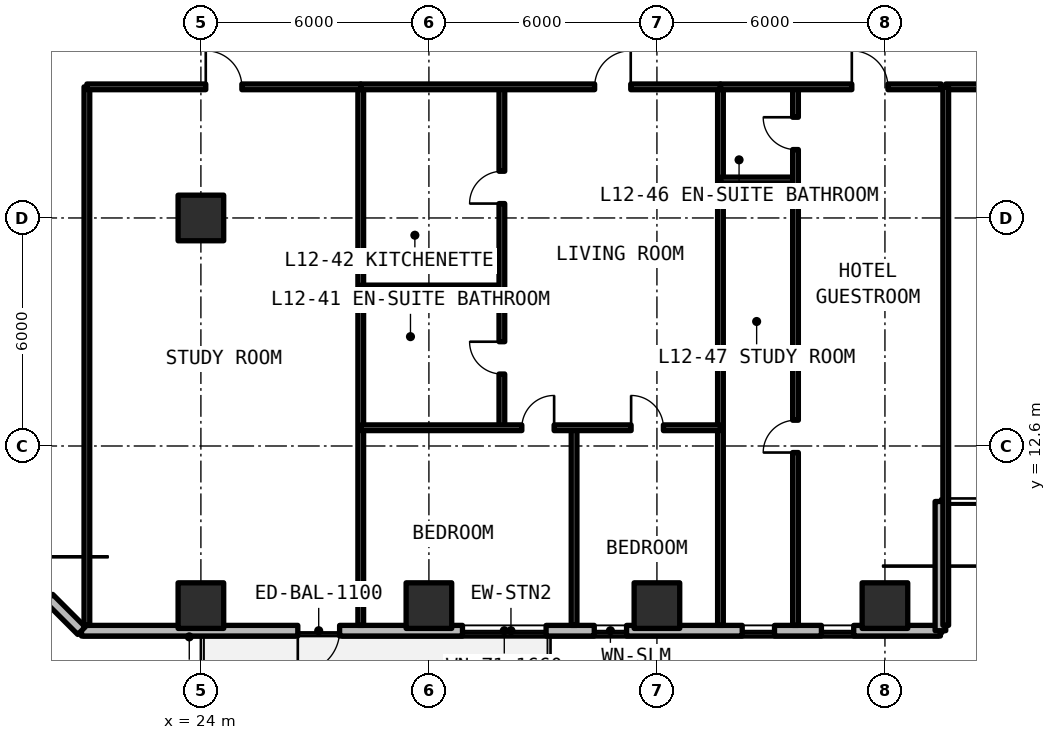
"""IFC4 building model, lengths in metres.
Left out: names, types, materials, properties, quantities, classifications, styles, units other than length and angle.
Written with IfcOpenShell. Run it as: python <this file> out.ifc"""

import sys

from ifc_helpers import new_model, si_unit, direction, frame, frame_2d, origin, origin_2d, place, context, subcontext, project, spatial, rectangle, extrude, element, fill, save


model = new_model("IFC4")
c1 = context("Model", 3, precision=1e-05, world=origin(), true_north=direction((0.0, 1.0)))
c2 = subcontext(c1, "Body", "Model", "MODEL_VIEW")
j1 = project(units=[si_unit("LENGTHUNIT", "METRE"), si_unit("PLANEANGLEUNIT", "RADIAN")], contexts=[c1])
p1 = place(None, origin())
s1 = spatial("IfcSite", under=j1, at=p1, CompositionType="ELEMENT")
p2 = place(p1, origin())
s2 = spatial("IfcBuilding", under=s1, at=p2, CompositionType="ELEMENT")
p3 = place(p2, frame((0.0, 0.0, 45.54)))
s3 = spatial("IfcBuildingStorey", under=s2, at=p3, CompositionType="ELEMENT", Elevation=45.54)
for number, where, z_axis, x_axis in (
    (1, (24.0, 18.6, 0.0), (0.0, 0.0, 1.0), (1.0, 0.0, 0.0)),
    (2, (24.0, 8.4, 0.0), (0.0, 0.0, 1.0), (1.0, 0.0, 0.0)),
    (3, (30.0, 8.4, 0.0), (0.0, 0.0, 1.0), (1.0, 0.0, 0.0)),
    (4, (36.0, 8.4, 0.0), (0.0, 0.0, 1.0), (1.0, 0.0, 0.0)),
    (5, (42.0, 8.4, 0.0), (0.0, 0.0, 1.0), (1.0, 0.0, 0.0)),
):
    element("IfcColumn", number, at=place(p3, frame(where, z_axis=z_axis, x_axis=x_axis)), inside=s3, PredefinedType="COLUMN", context=c2, shape_type="SweptSolid", body=[
        extrude(rectangle(XDim=1.2, YDim=1.2, at=origin_2d()), origin(), (0.0, 0.0, 1.0), 3.3),
    ])
p4 = place(p3, frame((20.858, 7.74, 0.0), z_axis=(0.0, 0.0, 1.0), x_axis=(1.0, 0.0, 0.0)))
e6 = element("IfcWall", 6, at=p4, inside=s3, PredefinedType="SOLIDWALL", context=c2, shape_type="SweptSolid", body=[
    extrude(rectangle(XDim=22.602, YDim=0.28, at=frame_2d((11.301, 0.0))), origin(), (0.0, 0.0, 1.0), 3.08),
])
p5 = place(p4, frame((5.692, 0.0, 0.0)))
e7 = element("IfcOpeningElement", 7, at=p5, cuts=e6, PredefinedType="OPENING", context=c2, shape_type="SweptSolid", body=[
    extrude(rectangle(XDim=1.1, YDim=2.15, at=frame_2d((0.55, 1.075))), frame((0.0, 0.15, 0.0), z_axis=(0.0, -1.0, 0.0), x_axis=(1.0, 0.0, 0.0)), (0.0, 0.0, 1.0), 0.3),
])
p6 = place(p4, frame((10.025, 0.0, 0.78)))
e8 = element("IfcOpeningElement", 8, at=p6, cuts=e6, PredefinedType="OPENING", context=c2, shape_type="SweptSolid", body=[
    extrude(rectangle(XDim=2.2, YDim=1.66, at=frame_2d((1.1, 0.83))), frame((0.0, 0.15, 0.0), z_axis=(0.0, -1.0, 0.0), x_axis=(1.0, 0.0, 0.0)), (0.0, 0.0, 1.0), 0.3),
])
p7 = place(p4, frame((13.493, 0.0, 0.78)))
e9 = element("IfcOpeningElement", 9, at=p7, cuts=e6, PredefinedType="OPENING", context=c2, shape_type="SweptSolid", body=[
    extrude(rectangle(XDim=0.85, YDim=1.65, at=frame_2d((0.425, 0.825))), frame((0.0, 0.15, 0.0), z_axis=(0.0, -1.0, 0.0), x_axis=(1.0, 0.0, 0.0)), (0.0, 0.0, 1.0), 0.3),
])
p8 = place(p4, frame((17.386, 0.0, 0.78)))
e10 = element("IfcOpeningElement", 10, at=p8, cuts=e6, PredefinedType="OPENING", context=c2, shape_type="SweptSolid", body=[
    extrude(rectangle(XDim=0.85, YDim=1.65, at=frame_2d((0.425, 0.825))), frame((0.0, 0.15, 0.0), z_axis=(0.0, -1.0, 0.0), x_axis=(1.0, 0.0, 0.0)), (0.0, 0.0, 1.0), 0.3),
])
p9 = place(p4, frame((19.47, 0.0, 0.78)))
e11 = element("IfcOpeningElement", 11, at=p9, cuts=e6, PredefinedType="OPENING", context=c2, shape_type="SweptSolid", body=[
    extrude(rectangle(XDim=0.85, YDim=1.65, at=frame_2d((0.425, 0.825))), frame((0.0, 0.15, 0.0), z_axis=(0.0, -1.0, 0.0), x_axis=(1.0, 0.0, 0.0)), (0.0, 0.0, 1.0), 0.3),
])
p10 = place(p3, frame((43.46, 7.74, 0.0), z_axis=(0.0, 0.0, 1.0), x_axis=(0.0, 1.0, 0.0)))
e12 = element("IfcWall", 12, at=p10, inside=s3, PredefinedType="SOLIDWALL", context=c2, shape_type="SweptSolid", body=[
    extrude(rectangle(XDim=3.4, YDim=0.28, at=frame_2d((1.7, 0.0))), origin(), (0.0, 0.0, 1.0), 3.08),
])
p11 = place(p3, frame((16.74, 11.858, 0.0), z_axis=(0.0, 0.0, 1.0), x_axis=(0.707106781187, -0.707106781187, 0.0)))
e13 = element("IfcWall", 13, at=p11, inside=s3, PredefinedType="SOLIDWALL", context=c2, shape_type="SweptSolid", body=[
    extrude(rectangle(XDim=5.824, YDim=0.28, at=frame_2d((2.912, 0.0))), origin(), (0.0, 0.0, 1.0), 3.08),
])
p12 = place(p11, frame((1.212, 0.0, 0.78)))
e14 = element("IfcOpeningElement", 14, at=p12, cuts=e13, PredefinedType="OPENING", context=c2, shape_type="SweptSolid", body=[
    extrude(rectangle(XDim=3.4, YDim=1.66, at=frame_2d((1.7, 0.83))), frame((0.0, 0.15, 0.0), z_axis=(0.0, -1.0, 0.0), x_axis=(1.0, 0.0, 0.0)), (0.0, 0.0, 1.0), 0.3),
])
p13 = place(p3, frame((43.6, 22.05, 0.0), z_axis=(0.0, 0.0, 1.0), x_axis=(1.0, 0.0, 0.0)))
e15 = element("IfcWall", 15, at=p13, inside=s3, PredefinedType="SOLIDWALL", context=c2, shape_type="SweptSolid", body=[
    extrude(rectangle(XDim=8.4, YDim=0.15, at=frame_2d((4.2, 0.0))), origin(), (0.0, 0.0, 1.0), 2.35),
])
p14 = place(p13, frame((3.65, 0.0, 0.0)))
e16 = element("IfcOpeningElement", 16, at=p14, cuts=e15, PredefinedType="OPENING", context=c2, shape_type="SweptSolid", body=[
    extrude(rectangle(XDim=1.1, YDim=2.15, at=frame_2d((0.55, 1.075))), frame((0.0, 0.085, 0.0), z_axis=(0.0, -1.0, 0.0), x_axis=(1.0, 0.0, 0.0)), (0.0, 0.0, 1.0), 0.17),
])
for number, where, z_axis, x_axis in (
    (17, (43.6, 7.88, 0.0), (0.0, 0.0, 1.0), (0.0, 1.0, 0.0)),
    (18, (21.0, 7.88, 0.0), (0.0, 0.0, 1.0), (0.0, 1.0, 0.0)),
    (19, (28.207, 7.88, 0.0), (0.0, 0.0, 1.0), (0.0, 1.0, 0.0)),
):
    element("IfcWall", number, at=place(p3, frame(where, z_axis=z_axis, x_axis=x_axis)), inside=s3, PredefinedType="SOLIDWALL", context=c2, shape_type="SweptSolid", body=[
        extrude(rectangle(XDim=14.17, YDim=0.15, at=frame_2d((7.085, 0.0))), origin(), (0.0, 0.0, 1.0), 2.35),
    ])
p15 = place(p3, frame((21.0, 22.05, 0.0), z_axis=(0.0, 0.0, 1.0), x_axis=(1.0, 0.0, 0.0)))
e20 = element("IfcWall", 20, at=p15, inside=s3, PredefinedType="SOLIDWALL", context=c2, shape_type="SweptSolid", body=[
    extrude(rectangle(XDim=7.207, YDim=0.15, at=frame_2d((3.603, 0.0))), origin(), (0.0, 0.0, 1.0), 2.35),
])
p16 = place(p15, frame((3.128, 0.0, 0.0)))
e21 = element("IfcOpeningElement", 21, at=p16, cuts=e20, PredefinedType="OPENING", context=c2, shape_type="SweptSolid", body=[
    extrude(rectangle(XDim=0.95, YDim=2.15, at=frame_2d((0.475, 1.075))), frame((0.0, 0.085, 0.0), z_axis=(0.0, -1.0, 0.0), x_axis=(1.0, 0.0, 0.0)), (0.0, 0.0, 1.0), 0.17),
])
p17 = place(p3, frame((37.672, 7.88, 0.0), z_axis=(0.0, 0.0, 1.0), x_axis=(0.0, 1.0, 0.0)))
e22 = element("IfcWall", 22, at=p17, inside=s3, PredefinedType="SOLIDWALL", context=c2, shape_type="SweptSolid", body=[
    extrude(rectangle(XDim=14.17, YDim=0.15, at=frame_2d((7.085, 0.0))), origin(), (0.0, 0.0, 1.0), 2.35),
])
p18 = place(p3, frame((28.207, 16.758, 0.0), z_axis=(0.0, 0.0, 1.0), x_axis=(1.0, 0.0, 0.0)))
e23 = element("IfcWall", 23, at=p18, inside=s3, PredefinedType="PARTITIONING", context=c2, shape_type="SweptSolid", body=[
    extrude(rectangle(XDim=3.713, YDim=0.15, at=frame_2d((1.857, 0.0))), origin(), (0.0, 0.0, 1.0), 2.35),
])
p19 = place(p3, frame((31.92, 13.08, 0.0), z_axis=(0.0, 0.0, 1.0), x_axis=(0.0, 1.0, 0.0)))
e24 = element("IfcWall", 24, at=p19, inside=s3, PredefinedType="PARTITIONING", context=c2, shape_type="SweptSolid", body=[
    extrude(rectangle(XDim=8.97, YDim=0.15, at=frame_2d((4.485, 0.0))), origin(), (0.0, 0.0, 1.0), 2.35),
])
p20 = place(p19, frame((1.414, 0.0, 0.0)))
e25 = element("IfcOpeningElement", 25, at=p20, cuts=e24, PredefinedType="OPENING", context=c2, shape_type="SweptSolid", body=[
    extrude(rectangle(XDim=0.85, YDim=2.1, at=frame_2d((0.425, 1.05))), frame((0.0, 0.085, 0.0), z_axis=(0.0, -1.0, 0.0), x_axis=(1.0, 0.0, 0.0)), (0.0, 0.0, 1.0), 0.17),
])
p21 = place(p19, frame((5.899, 0.0, 0.0)))
e26 = element("IfcOpeningElement", 26, at=p21, cuts=e24, PredefinedType="OPENING", context=c2, shape_type="SweptSolid", body=[
    extrude(rectangle(XDim=0.85, YDim=2.1, at=frame_2d((0.425, 1.05))), frame((0.0, 0.085, 0.0), z_axis=(0.0, -1.0, 0.0), x_axis=(1.0, 0.0, 0.0)), (0.0, 0.0, 1.0), 0.17),
])
p22 = place(p3, frame((33.82, 7.88, 0.0), z_axis=(0.0, 0.0, 1.0), x_axis=(0.0, 1.0, 0.0)))
e27 = element("IfcWall", 27, at=p22, inside=s3, PredefinedType="PARTITIONING", context=c2, shape_type="SweptSolid", body=[
    extrude(rectangle(XDim=5.2, YDim=0.15, at=frame_2d((2.6, 0.0))), origin(), (0.0, 0.0, 1.0), 2.35),
])
p23 = place(p3, frame((28.207, 13.08, 0.0), z_axis=(0.0, 0.0, 1.0), x_axis=(1.0, 0.0, 0.0)))
e28 = element("IfcWall", 28, at=p23, inside=s3, PredefinedType="PARTITIONING", context=c2, shape_type="SweptSolid", body=[
    extrude(rectangle(XDim=9.465, YDim=0.15, at=frame_2d((4.733, 0.0))), origin(), (0.0, 0.0, 1.0), 2.35),
])
p24 = place(p23, frame((4.239, 0.0, 0.0)))
e29 = element("IfcOpeningElement", 29, at=p24, cuts=e28, PredefinedType="OPENING", context=c2, shape_type="SweptSolid", body=[
    extrude(rectangle(XDim=0.85, YDim=2.1, at=frame_2d((0.425, 1.05))), frame((0.0, 0.085, 0.0), z_axis=(0.0, -1.0, 0.0), x_axis=(1.0, 0.0, 0.0)), (0.0, 0.0, 1.0), 0.17),
])
p25 = place(p23, frame((7.115, 0.0, 0.0)))
e30 = element("IfcOpeningElement", 30, at=p25, cuts=e28, PredefinedType="OPENING", context=c2, shape_type="SweptSolid", body=[
    extrude(rectangle(XDim=0.85, YDim=2.1, at=frame_2d((0.425, 1.05))), frame((0.0, 0.085, 0.0), z_axis=(0.0, -1.0, 0.0), x_axis=(1.0, 0.0, 0.0)), (0.0, 0.0, 1.0), 0.17),
])
p26 = place(p3, frame((28.207, 22.05, 0.0), z_axis=(0.0, 0.0, 1.0), x_axis=(1.0, 0.0, 0.0)))
e31 = element("IfcWall", 31, at=p26, inside=s3, PredefinedType="SOLIDWALL", context=c2, shape_type="SweptSolid", body=[
    extrude(rectangle(XDim=9.465, YDim=0.15, at=frame_2d((4.733, 0.0))), origin(), (0.0, 0.0, 1.0), 2.35),
])
p27 = place(p26, frame((6.154, 0.0, 0.0)))
e32 = element("IfcOpeningElement", 32, at=p27, cuts=e31, PredefinedType="OPENING", context=c2, shape_type="SweptSolid", body=[
    extrude(rectangle(XDim=0.95, YDim=2.15, at=frame_2d((0.475, 1.075))), frame((0.0, 0.085, 0.0), z_axis=(0.0, -1.0, 0.0), x_axis=(1.0, 0.0, 0.0)), (0.0, 0.0, 1.0), 0.17),
])
p28 = place(p3, frame((37.672, 19.6, 0.0), z_axis=(0.0, 0.0, 1.0), x_axis=(1.0, 0.0, 0.0)))
e33 = element("IfcWall", 33, at=p28, inside=s3, PredefinedType="PARTITIONING", context=c2, shape_type="SweptSolid", body=[
    extrude(rectangle(XDim=1.975, YDim=0.15, at=frame_2d((0.987, 0.0))), origin(), (0.0, 0.0, 1.0), 2.35),
])
p29 = place(p3, frame((39.646, 7.88, 0.0), z_axis=(0.0, 0.0, 1.0), x_axis=(0.0, 1.0, 0.0)))
e34 = element("IfcWall", 34, at=p29, inside=s3, PredefinedType="PARTITIONING", context=c2, shape_type="SweptSolid", body=[
    extrude(rectangle(XDim=14.17, YDim=0.15, at=frame_2d((7.085, 0.0))), origin(), (0.0, 0.0, 1.0), 2.35),
])
p30 = place(p29, frame((4.548, 0.0, 0.0)))
e35 = element("IfcOpeningElement", 35, at=p30, cuts=e34, PredefinedType="OPENING", context=c2, shape_type="SweptSolid", body=[
    extrude(rectangle(XDim=0.85, YDim=2.1, at=frame_2d((0.425, 1.05))), frame((0.0, 0.085, 0.0), z_axis=(0.0, -1.0, 0.0), x_axis=(1.0, 0.0, 0.0)), (0.0, 0.0, 1.0), 0.17),
])
p31 = place(p29, frame((12.52, 0.0, 0.0)))
e36 = element("IfcOpeningElement", 36, at=p31, cuts=e34, PredefinedType="OPENING", context=c2, shape_type="SweptSolid", body=[
    extrude(rectangle(XDim=0.85, YDim=2.1, at=frame_2d((0.425, 1.05))), frame((0.0, 0.085, 0.0), z_axis=(0.0, -1.0, 0.0), x_axis=(1.0, 0.0, 0.0)), (0.0, 0.0, 1.0), 0.17),
])
p32 = place(p3, frame((37.672, 22.05, 0.0), z_axis=(0.0, 0.0, 1.0), x_axis=(1.0, 0.0, 0.0)))
e37 = element("IfcWall", 37, at=p32, inside=s3, PredefinedType="SOLIDWALL", context=c2, shape_type="SweptSolid", body=[
    extrude(rectangle(XDim=5.808, YDim=0.15, at=frame_2d((2.904, 0.0))), origin(), (0.0, 0.0, 1.0), 2.35),
])
p33 = place(p32, frame((3.457, 0.0, 0.0)))
e38 = element("IfcOpeningElement", 38, at=p33, cuts=e37, PredefinedType="OPENING", context=c2, shape_type="SweptSolid", body=[
    extrude(rectangle(XDim=0.95, YDim=2.15, at=frame_2d((0.475, 1.075))), frame((0.0, 0.085, 0.0), z_axis=(0.0, -1.0, 0.0), x_axis=(1.0, 0.0, 0.0)), (0.0, 0.0, 1.0), 0.17),
])
p34 = place(p5, frame((1.1, 0.0, 0.0), z_axis=(0.0, 0.0, 1.0), x_axis=(-1.0, 0.0, 0.0)))
e39 = element("IfcDoor", 39, at=p34, inside=s3, OperationType="SINGLE_SWING_RIGHT", PredefinedType="DOOR", context=c2, shape_type="SweptSolid", body=[
    extrude(rectangle(XDim=1.1, YDim=2.15, at=frame_2d((0.55, 1.075))), frame((0.0, 0.025, 0.0), z_axis=(0.0, -1.0, 0.0), x_axis=(1.0, 0.0, 0.0)), (0.0, 0.0, 1.0), 0.05),
])
fill(e7, e39)
p35 = place(p6, origin())
e40 = element("IfcWindow", 40, at=p35, inside=s3, PartitioningType="SINGLE_PANEL", PredefinedType="WINDOW", context=c2, shape_type="SweptSolid", body=[
    extrude(rectangle(XDim=2.2, YDim=1.66, at=frame_2d((1.1, 0.83))), frame((0.0, 0.03, 0.0), z_axis=(0.0, -1.0, 0.0), x_axis=(1.0, 0.0, 0.0)), (0.0, 0.0, 1.0), 0.06),
])
fill(e8, e40)
p36 = place(p7, origin())
e41 = element("IfcWindow", 41, at=p36, inside=s3, PartitioningType="SINGLE_PANEL", PredefinedType="WINDOW", context=c2, shape_type="SweptSolid", body=[
    extrude(rectangle(XDim=0.85, YDim=1.65, at=frame_2d((0.425, 0.825))), frame((0.0, 0.03, 0.0), z_axis=(0.0, -1.0, 0.0), x_axis=(1.0, 0.0, 0.0)), (0.0, 0.0, 1.0), 0.06),
])
fill(e9, e41)
p37 = place(p8, origin())
e42 = element("IfcWindow", 42, at=p37, inside=s3, PartitioningType="SINGLE_PANEL", PredefinedType="WINDOW", context=c2, shape_type="SweptSolid", body=[
    extrude(rectangle(XDim=0.85, YDim=1.65, at=frame_2d((0.425, 0.825))), frame((0.0, 0.03, 0.0), z_axis=(0.0, -1.0, 0.0), x_axis=(1.0, 0.0, 0.0)), (0.0, 0.0, 1.0), 0.06),
])
fill(e10, e42)
p38 = place(p9, origin())
e43 = element("IfcWindow", 43, at=p38, inside=s3, PartitioningType="SINGLE_PANEL", PredefinedType="WINDOW", context=c2, shape_type="SweptSolid", body=[
    extrude(rectangle(XDim=0.85, YDim=1.65, at=frame_2d((0.425, 0.825))), frame((0.0, 0.03, 0.0), z_axis=(0.0, -1.0, 0.0), x_axis=(1.0, 0.0, 0.0)), (0.0, 0.0, 1.0), 0.06),
])
fill(e11, e43)
p39 = place(p16, origin())
e44 = element("IfcDoor", 44, at=p39, inside=s3, OperationType="SINGLE_SWING_LEFT", PredefinedType="DOOR", context=c2, shape_type="SweptSolid", body=[
    extrude(rectangle(XDim=0.95, YDim=2.15, at=frame_2d((0.475, 1.075))), frame((0.0, 0.025, 0.0), z_axis=(0.0, -1.0, 0.0), x_axis=(1.0, 0.0, 0.0)), (0.0, 0.0, 1.0), 0.05),
])
fill(e21, e44)
p40 = place(p20, origin())
e45 = element("IfcDoor", 45, at=p40, inside=s3, OperationType="SINGLE_SWING_RIGHT", PredefinedType="DOOR", context=c2, shape_type="SweptSolid", body=[
    extrude(rectangle(XDim=0.85, YDim=2.1, at=frame_2d((0.425, 1.05))), frame((0.0, 0.025, 0.0), z_axis=(0.0, -1.0, 0.0), x_axis=(1.0, 0.0, 0.0)), (0.0, 0.0, 1.0), 0.05),
])
fill(e25, e45)
p41 = place(p21, origin())
e46 = element("IfcDoor", 46, at=p41, inside=s3, OperationType="SINGLE_SWING_LEFT", PredefinedType="DOOR", context=c2, shape_type="SweptSolid", body=[
    extrude(rectangle(XDim=0.85, YDim=2.1, at=frame_2d((0.425, 1.05))), frame((0.0, 0.025, 0.0), z_axis=(0.0, -1.0, 0.0), x_axis=(1.0, 0.0, 0.0)), (0.0, 0.0, 1.0), 0.05),
])
fill(e26, e46)
p42 = place(p24, origin())
e47 = element("IfcDoor", 47, at=p42, inside=s3, OperationType="SINGLE_SWING_RIGHT", PredefinedType="DOOR", context=c2, shape_type="SweptSolid", body=[
    extrude(rectangle(XDim=0.85, YDim=2.1, at=frame_2d((0.425, 1.05))), frame((0.0, 0.025, 0.0), z_axis=(0.0, -1.0, 0.0), x_axis=(1.0, 0.0, 0.0)), (0.0, 0.0, 1.0), 0.05),
])
fill(e29, e47)
p43 = place(p25, origin())
e48 = element("IfcDoor", 48, at=p43, inside=s3, OperationType="SINGLE_SWING_LEFT", PredefinedType="DOOR", context=c2, shape_type="SweptSolid", body=[
    extrude(rectangle(XDim=0.85, YDim=2.1, at=frame_2d((0.425, 1.05))), frame((0.0, 0.025, 0.0), z_axis=(0.0, -1.0, 0.0), x_axis=(1.0, 0.0, 0.0)), (0.0, 0.0, 1.0), 0.05),
])
fill(e30, e48)
p44 = place(p27, origin())
e49 = element("IfcDoor", 49, at=p44, inside=s3, OperationType="SINGLE_SWING_RIGHT", PredefinedType="DOOR", context=c2, shape_type="SweptSolid", body=[
    extrude(rectangle(XDim=0.95, YDim=2.15, at=frame_2d((0.475, 1.075))), frame((0.0, 0.025, 0.0), z_axis=(0.0, -1.0, 0.0), x_axis=(1.0, 0.0, 0.0)), (0.0, 0.0, 1.0), 0.05),
])
fill(e32, e49)
p45 = place(p30, origin())
e50 = element("IfcDoor", 50, at=p45, inside=s3, OperationType="SINGLE_SWING_LEFT", PredefinedType="DOOR", context=c2, shape_type="SweptSolid", body=[
    extrude(rectangle(XDim=0.85, YDim=2.1, at=frame_2d((0.425, 1.05))), frame((0.0, 0.025, 0.0), z_axis=(0.0, -1.0, 0.0), x_axis=(1.0, 0.0, 0.0)), (0.0, 0.0, 1.0), 0.05),
])
fill(e35, e50)
p46 = place(p31, origin())
e51 = element("IfcDoor", 51, at=p46, inside=s3, OperationType="SINGLE_SWING_RIGHT", PredefinedType="DOOR", context=c2, shape_type="SweptSolid", body=[
    extrude(rectangle(XDim=0.85, YDim=2.1, at=frame_2d((0.425, 1.05))), frame((0.0, 0.025, 0.0), z_axis=(0.0, -1.0, 0.0), x_axis=(1.0, 0.0, 0.0)), (0.0, 0.0, 1.0), 0.05),
])
fill(e36, e51)
p47 = place(p33, origin())
e52 = element("IfcDoor", 52, at=p47, inside=s3, OperationType="SINGLE_SWING_LEFT", PredefinedType="DOOR", context=c2, shape_type="SweptSolid", body=[
    extrude(rectangle(XDim=0.95, YDim=2.15, at=frame_2d((0.475, 1.075))), frame((0.0, 0.025, 0.0), z_axis=(0.0, -1.0, 0.0), x_axis=(1.0, 0.0, 0.0)), (0.0, 0.0, 1.0), 0.05),
])
fill(e38, e52)
save(model, sys.argv[1])
